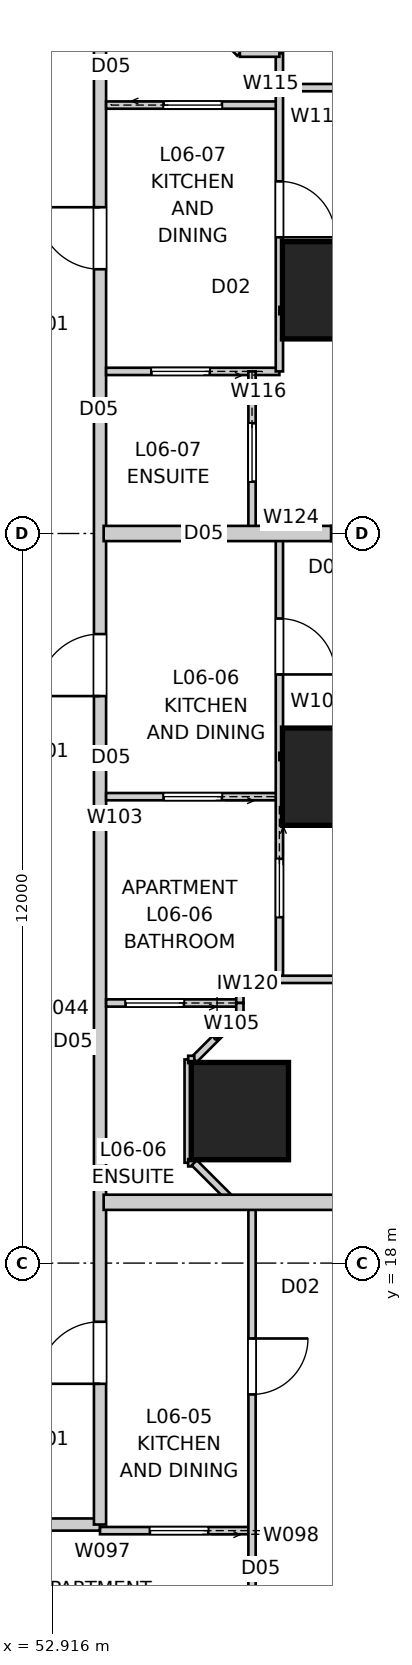
"""IFC4 building model, lengths in metres.
Left out: names, types, materials, properties, quantities, classifications, styles, units other than length and angle.
Written with IfcOpenShell. Run it as: python <this file> out.ifc"""

import sys

from ifc_helpers import new_model, si_unit, direction, frame, frame_2d, origin, origin_2d, place, context, subcontext, project, spatial, rectangle, extrude, element, fill, save


model = new_model("IFC4")
c1 = context("Model", 3, precision=1e-05, world=origin(), true_north=direction((0.0, 1.0)))
c2 = subcontext(c1, "Body", "Model", "MODEL_VIEW")
j1 = project(units=[si_unit("LENGTHUNIT", "METRE"), si_unit("PLANEANGLEUNIT", "RADIAN")], contexts=[c1])
p1 = place(None, origin())
s1 = spatial("IfcSite", under=j1, at=p1, CompositionType="ELEMENT")
p2 = place(p1, origin())
s2 = spatial("IfcBuilding", under=s1, at=p2, CompositionType="ELEMENT")
p3 = place(p2, frame((0.0, 0.0, 25.2)))
s3 = spatial("IfcBuildingStorey", under=s2, at=p3, CompositionType="ELEMENT", Elevation=25.2)
for number, where, z_axis, x_axis in (
    (1, (57.5, 26.0, 0.0), (0.0, 0.0, 1.0), (1.0, 0.0, 0.0)),
    (2, (57.5, 34.0, 0.0), (0.0, 0.0, 1.0), (1.0, 0.0, 0.0)),
    (3, (56.0, 20.5, 0.0), (0.0, 0.0, 1.0), (1.0, 0.0, 0.0)),
):
    element("IfcColumn", number, at=place(p3, frame(where, z_axis=z_axis, x_axis=x_axis)), inside=s3, PredefinedType="COLUMN", context=c2, shape_type="SweptSolid", body=[
        extrude(rectangle(XDim=1.6, YDim=1.6, at=origin_2d()), origin(), (0.0, 0.0, 1.0), 3.4),
    ])
p4 = place(p3, frame((49.242, 13.7, 0.0), z_axis=(0.0, 0.0, 1.0), x_axis=(1.0, 0.0, 0.0)))
e4 = element("IfcWall", 4, at=p4, inside=s3, PredefinedType="PARTITIONING", context=c2, shape_type="SweptSolid", body=[
    extrude(rectangle(XDim=4.458, YDim=0.2, at=frame_2d((2.229, 0.0))), origin(), (0.0, 0.0, 1.0), 3.25),
])
p5 = place(p3, frame((53.7, 13.7, 0.0), z_axis=(0.0, 0.0, 1.0), x_axis=(0.0, 1.0, 0.0)))
e5 = element("IfcWall", 5, at=p5, inside=s3, PredefinedType="PARTITIONING", context=c2, shape_type="SweptSolid", body=[
    extrude(rectangle(XDim=32.6, YDim=0.2, at=frame_2d((16.3, 0.0))), origin(), (0.0, 0.0, 1.0), 3.25),
])
p6 = place(p5, frame((2.315, 0.0, 0.0)))
e6 = element("IfcOpeningElement", 6, at=p6, cuts=e5, PredefinedType="OPENING", context=c2, shape_type="SweptSolid", body=[
    extrude(rectangle(XDim=1.02, YDim=2.34, at=frame_2d((0.51, 1.17))), frame((0.0, 0.11, 0.0), z_axis=(0.0, -1.0, 0.0), x_axis=(1.0, 0.0, 0.0)), (0.0, 0.0, 1.0), 0.22),
])
p7 = place(p5, frame((29.265, 0.0, 0.0)))
e7 = element("IfcOpeningElement", 7, at=p7, cuts=e5, PredefinedType="OPENING", context=c2, shape_type="SweptSolid", body=[
    extrude(rectangle(XDim=1.02, YDim=2.34, at=frame_2d((0.51, 1.17))), frame((0.0, 0.11, 0.0), z_axis=(0.0, -1.0, 0.0), x_axis=(1.0, 0.0, 0.0)), (0.0, 0.0, 1.0), 0.22),
])
p8 = place(p5, frame((20.646, 0.0, 0.0)))
e8 = element("IfcOpeningElement", 8, at=p8, cuts=e5, PredefinedType="OPENING", context=c2, shape_type="SweptSolid", body=[
    extrude(rectangle(XDim=1.02, YDim=2.34, at=frame_2d((0.51, 1.17))), frame((0.0, 0.11, 0.0), z_axis=(0.0, -1.0, 0.0), x_axis=(1.0, 0.0, 0.0)), (0.0, 0.0, 1.0), 0.22),
])
p9 = place(p5, frame((13.626, 0.0, 0.0)))
e9 = element("IfcOpeningElement", 9, at=p9, cuts=e5, PredefinedType="OPENING", context=c2, shape_type="SweptSolid", body=[
    extrude(rectangle(XDim=1.02, YDim=2.34, at=frame_2d((0.51, 1.17))), frame((0.0, 0.11, 0.0), z_axis=(0.0, -1.0, 0.0), x_axis=(1.0, 0.0, 0.0)), (0.0, 0.0, 1.0), 0.22),
])
p10 = place(p3, frame((66.0, 19.0, 0.0), z_axis=(0.0, 0.0, 1.0), x_axis=(-1.0, 0.0, 0.0)))
e10 = element("IfcWall", 10, at=p10, inside=s3, PredefinedType="PARTITIONING", context=c2, shape_type="SweptSolid", body=[
    extrude(rectangle(XDim=12.24, YDim=0.25, at=frame_2d((6.12, 0.0))), origin(), (0.0, 0.0, 1.0), 3.25),
])
p11 = place(p3, frame((66.0, 30.0, 0.0), z_axis=(0.0, 0.0, 1.0), x_axis=(-1.0, 0.0, 0.0)))
e11 = element("IfcWall", 11, at=p11, inside=s3, PredefinedType="PARTITIONING", context=c2, shape_type="SweptSolid", body=[
    extrude(rectangle(XDim=8.5, YDim=0.25, at=frame_2d((4.25, 0.0))), origin(), (0.0, 0.0, 1.0), 3.25),
])
p12 = place(p3, frame((57.5, 30.0, 0.0), z_axis=(0.0, 0.0, 1.0), x_axis=(-1.0, 0.0, 0.0)))
e12 = element("IfcWall", 12, at=p12, inside=s3, PredefinedType="PARTITIONING", context=c2, shape_type="SweptSolid", body=[
    extrude(rectangle(XDim=3.74, YDim=0.25, at=frame_2d((1.87, 0.0))), origin(), (0.0, 0.0, 1.0), 2.796),
])
p13 = place(p3, frame((56.2, 13.6, 0.0), z_axis=(0.0, 0.0, 1.0), x_axis=(-1.0, 0.0, 0.0)))
e13 = element("IfcWall", 13, at=p13, inside=s3, PredefinedType="PARTITIONING", context=c2, shape_type="SweptSolid", body=[
    extrude(rectangle(XDim=2.5, YDim=0.12, at=frame_2d((1.25, 0.0))), origin(), (0.0, 0.0, 1.0), 3.25),
])
p14 = place(p13, frame((0.72, 0.0, 0.0)))
e14 = element("IfcOpeningElement", 14, at=p14, cuts=e13, PredefinedType="OPENING", context=c2, shape_type="SweptSolid", body=[
    extrude(rectangle(XDim=0.96, YDim=2.1, at=frame_2d((0.48, 1.05))), frame((0.0, 0.07, 0.0), z_axis=(0.0, -1.0, 0.0), x_axis=(1.0, 0.0, 0.0)), (0.0, 0.0, 1.0), 0.14),
])
p15 = place(p3, frame((56.2, 19.0, 0.0), z_axis=(0.0, 0.0, 1.0), x_axis=(0.0, -1.0, 0.0)))
e15 = element("IfcWall", 15, at=p15, inside=s3, PredefinedType="PARTITIONING", context=c2, shape_type="SweptSolid", body=[
    extrude(rectangle(XDim=7.8, YDim=0.12, at=frame_2d((3.9, 0.0))), origin(), (0.0, 0.0, 1.0), 3.25),
])
p16 = place(p15, frame((2.24, 0.0, 0.0)))
e16 = element("IfcOpeningElement", 16, at=p16, cuts=e15, PredefinedType="OPENING", context=c2, shape_type="SweptSolid", body=[
    extrude(rectangle(XDim=0.92, YDim=2.34, at=frame_2d((0.46, 1.17))), frame((0.0, 0.07, 0.0), z_axis=(0.0, -1.0, 0.0), x_axis=(1.0, 0.0, 0.0)), (0.0, 0.0, 1.0), 0.14),
])
p17 = place(p3, frame((56.65, 25.672, 0.0), z_axis=(0.0, 0.0, 1.0), x_axis=(-1.0, 0.0, 0.0)))
e17 = element("IfcWall", 17, at=p17, inside=s3, PredefinedType="PARTITIONING", context=c2, shape_type="SweptSolid", body=[
    extrude(rectangle(XDim=2.85, YDim=0.12, at=frame_2d((1.425, 0.0))), origin(), (0.0, 0.0, 1.0), 3.25),
])
p18 = place(p17, frame((0.945, 0.0, 0.0)))
e18 = element("IfcOpeningElement", 18, at=p18, cuts=e17, PredefinedType="OPENING", context=c2, shape_type="SweptSolid", body=[
    extrude(rectangle(XDim=0.96, YDim=2.1, at=frame_2d((0.48, 1.05))), frame((0.0, 0.07, 0.0), z_axis=(0.0, -1.0, 0.0), x_axis=(1.0, 0.0, 0.0)), (0.0, 0.0, 1.0), 0.14),
])
p19 = place(p3, frame((56.65, 30.0, 0.0), z_axis=(0.0, 0.0, 1.0), x_axis=(0.0, -1.0, 0.0)))
e19 = element("IfcWall", 19, at=p19, inside=s3, PredefinedType="PARTITIONING", context=c2, shape_type="SweptSolid", body=[
    extrude(rectangle(XDim=7.333, YDim=0.12, at=frame_2d((3.667, 0.0))), origin(), (0.0, 0.0, 1.0), 2.55),
])
p20 = place(p19, frame((1.398, 0.0, 0.0)))
e20 = element("IfcOpeningElement", 20, at=p20, cuts=e19, PredefinedType="OPENING", context=c2, shape_type="SweptSolid", body=[
    extrude(rectangle(XDim=0.92, YDim=2.34, at=frame_2d((0.46, 1.17))), frame((0.0, 0.07, 0.0), z_axis=(0.0, -1.0, 0.0), x_axis=(1.0, 0.0, 0.0)), (0.0, 0.0, 1.0), 0.14),
])
p21 = place(p19, frame((5.351, 0.0, 0.0)))
e21 = element("IfcOpeningElement", 21, at=p21, cuts=e19, PredefinedType="OPENING", context=c2, shape_type="SweptSolid", body=[
    extrude(rectangle(XDim=0.96, YDim=2.1, at=frame_2d((0.48, 1.05))), frame((0.0, 0.07, 0.0), z_axis=(0.0, -1.0, 0.0), x_axis=(1.0, 0.0, 0.0)), (0.0, 0.0, 1.0), 0.14),
])
p22 = place(p3, frame((56.0, 22.278, 0.0), z_axis=(0.0, 0.0, 1.0), x_axis=(-1.0, 0.0, 0.0)))
e22 = element("IfcWall", 22, at=p22, inside=s3, PredefinedType="PARTITIONING", context=c2, shape_type="SweptSolid", body=[
    extrude(rectangle(XDim=2.2, YDim=0.12, at=frame_2d((1.1, 0.0))), origin(), (0.0, 0.0, 1.0), 3.25),
])
p23 = place(p22, frame((0.92, 0.0, 0.0)))
e23 = element("IfcOpeningElement", 23, at=p23, cuts=e22, PredefinedType="OPENING", context=c2, shape_type="SweptSolid", body=[
    extrude(rectangle(XDim=0.96, YDim=2.1, at=frame_2d((0.48, 1.05))), frame((0.0, 0.07, 0.0), z_axis=(0.0, -1.0, 0.0), x_axis=(1.0, 0.0, 0.0)), (0.0, 0.0, 1.0), 0.14),
])
p24 = place(p3, frame((65.96, 22.667, 0.0), z_axis=(0.0, 0.0, 1.0), x_axis=(-1.0, 0.0, 0.0)))
e24 = element("IfcWall", 24, at=p24, inside=s3, PredefinedType="PARTITIONING", context=c2, shape_type="SweptSolid", body=[
    extrude(rectangle(XDim=9.96, YDim=0.12, at=frame_2d((4.98, 0.0))), origin(), (0.0, 0.0, 1.0), 3.25),
])
p25 = place(p24, frame((4.2, 0.0, 0.0)))
e25 = element("IfcOpeningElement", 25, at=p25, cuts=e24, PredefinedType="OPENING", context=c2, shape_type="SweptSolid", body=[
    extrude(rectangle(XDim=0.92, YDim=2.34, at=frame_2d((0.46, 1.17))), frame((0.0, 0.07, 0.0), z_axis=(0.0, -1.0, 0.0), x_axis=(1.0, 0.0, 0.0)), (0.0, 0.0, 1.0), 0.14),
])
p26 = place(p3, frame((56.0, 22.667, 0.0), z_axis=(0.0, 0.0, 1.0), x_axis=(0.0, -1.0, 0.0)))
e26 = element("IfcWall", 26, at=p26, inside=s3, PredefinedType="PARTITIONING", context=c2, shape_type="SweptSolid", body=[
    extrude(rectangle(XDim=0.389, YDim=0.12, at=frame_2d((0.194, 0.0))), origin(), (0.0, 0.0, 1.0), 3.25),
])
p27 = place(p3, frame((56.0, 22.1, 0.0), z_axis=(0.0, 0.0, 1.0), x_axis=(-0.707106781187, -0.707106781187, 0.0)))
e27 = element("IfcWall", 27, at=p27, inside=s3, PredefinedType="PARTITIONING", context=c2, shape_type="SweptSolid", body=[
    extrude(rectangle(XDim=1.061, YDim=0.12, at=frame_2d((0.53, 0.0))), origin(), (0.0, 0.0, 1.0), 3.25),
])
p28 = place(p3, frame((55.15, 21.35, 0.0), z_axis=(0.0, 0.0, 1.0), x_axis=(0.0, -1.0, 0.0)))
e28 = element("IfcWall", 28, at=p28, inside=s3, PredefinedType="PARTITIONING", context=c2, shape_type="SweptSolid", body=[
    extrude(rectangle(XDim=1.7, YDim=0.12, at=frame_2d((0.85, 0.0))), origin(), (0.0, 0.0, 1.0), 3.25),
])
p29 = place(p3, frame((55.25, 19.65, 0.0), z_axis=(0.0, 0.0, 1.0), x_axis=(0.707106781187, -0.707106781187, 0.0)))
e29 = element("IfcWall", 29, at=p29, inside=s3, PredefinedType="PARTITIONING", context=c2, shape_type="SweptSolid", body=[
    extrude(rectangle(XDim=0.919, YDim=0.12, at=frame_2d((0.459, 0.0))), origin(), (0.0, 0.0, 1.0), 3.25),
])
p30 = place(p3, frame((65.96, 26.333, 0.0), z_axis=(0.0, 0.0, 1.0), x_axis=(-1.0, 0.0, 0.0)))
e30 = element("IfcWall", 30, at=p30, inside=s3, PredefinedType="PARTITIONING", context=c2, shape_type="SweptSolid", body=[
    extrude(rectangle(XDim=9.31, YDim=0.12, at=frame_2d((4.655, 0.0))), origin(), (0.0, 0.0, 1.0), 3.25),
])
p31 = place(p3, frame((53.8, 37.046, 0.0), z_axis=(0.0, 0.0, 1.0), x_axis=(1.0, 0.0, 0.0)))
e31 = element("IfcWall", 31, at=p31, inside=s3, PredefinedType="PARTITIONING", context=c2, shape_type="SweptSolid", body=[
    extrude(rectangle(XDim=2.85, YDim=0.12, at=frame_2d((1.425, 0.0))), origin(), (0.0, 0.0, 1.0), 3.25),
])
p32 = place(p31, frame((0.945, 0.0, 0.0)))
e32 = element("IfcOpeningElement", 32, at=p32, cuts=e31, PredefinedType="OPENING", context=c2, shape_type="SweptSolid", body=[
    extrude(rectangle(XDim=0.96, YDim=2.1, at=frame_2d((0.48, 1.05))), frame((0.0, 0.07, 0.0), z_axis=(0.0, -1.0, 0.0), x_axis=(1.0, 0.0, 0.0)), (0.0, 0.0, 1.0), 0.14),
])
p33 = place(p3, frame((56.65, 32.666, 0.0), z_axis=(0.0, 0.0, 1.0), x_axis=(-1.0, 0.0, 0.0)))
e33 = element("IfcWall", 33, at=p33, inside=s3, PredefinedType="PARTITIONING", context=c2, shape_type="SweptSolid", body=[
    extrude(rectangle(XDim=2.85, YDim=0.12, at=frame_2d((1.425, 0.0))), origin(), (0.0, 0.0, 1.0), 3.25),
])
p34 = place(p33, frame((1.145, 0.0, 0.0)))
e34 = element("IfcOpeningElement", 34, at=p34, cuts=e33, PredefinedType="OPENING", context=c2, shape_type="SweptSolid", body=[
    extrude(rectangle(XDim=0.96, YDim=2.1, at=frame_2d((0.48, 1.05))), frame((0.0, 0.07, 0.0), z_axis=(0.0, -1.0, 0.0), x_axis=(1.0, 0.0, 0.0)), (0.0, 0.0, 1.0), 0.14),
])
p35 = place(p3, frame((56.65, 37.9, 0.0), z_axis=(0.0, 0.0, 1.0), x_axis=(0.0, -1.0, 0.0)))
e35 = element("IfcWall", 35, at=p35, inside=s3, PredefinedType="PARTITIONING", context=c2, shape_type="SweptSolid", body=[
    extrude(rectangle(XDim=5.234, YDim=0.12, at=frame_2d((2.617, 0.0))), origin(), (0.0, 0.0, 1.0), 2.55),
])
p36 = place(p35, frame((2.109, 0.0, 0.0)))
e36 = element("IfcOpeningElement", 36, at=p36, cuts=e35, PredefinedType="OPENING", context=c2, shape_type="SweptSolid", body=[
    extrude(rectangle(XDim=0.92, YDim=2.34, at=frame_2d((0.46, 1.17))), frame((0.0, 0.07, 0.0), z_axis=(0.0, -1.0, 0.0), x_axis=(1.0, 0.0, 0.0)), (0.0, 0.0, 1.0), 0.14),
])
p37 = place(p3, frame((55.25, 38.65, 0.0), z_axis=(0.0, 0.0, 1.0), x_axis=(0.707106781187, -0.707106781187, 0.0)))
e37 = element("IfcWall", 37, at=p37, inside=s3, PredefinedType="PARTITIONING", context=c2, shape_type="SweptSolid", body=[
    extrude(rectangle(XDim=1.061, YDim=0.12, at=frame_2d((0.53, 0.0))), origin(), (0.0, 0.0, 1.0), 3.25),
])
p38 = place(p3, frame((56.0, 37.9, 0.0), z_axis=(0.0, 0.0, 1.0), x_axis=(1.0, 0.0, 0.0)))
e38 = element("IfcWall", 38, at=p38, inside=s3, PredefinedType="PARTITIONING", context=c2, shape_type="SweptSolid", body=[
    extrude(rectangle(XDim=0.65, YDim=0.12, at=frame_2d((0.325, 0.0))), origin(), (0.0, 0.0, 1.0), 3.25),
])
p39 = place(p3, frame((56.2, 32.666, 0.0), z_axis=(0.0, 0.0, 1.0), x_axis=(0.0, -1.0, 0.0)))
e39 = element("IfcWall", 39, at=p39, inside=s3, PredefinedType="PARTITIONING", context=c2, shape_type="SweptSolid", body=[
    extrude(rectangle(XDim=2.666, YDim=0.12, at=frame_2d((1.333, 0.0))), origin(), (0.0, 0.0, 1.0), 3.25),
])
p40 = place(p39, frame((0.853, 0.0, 0.0)))
e40 = element("IfcOpeningElement", 40, at=p40, cuts=e39, PredefinedType="OPENING", context=c2, shape_type="SweptSolid", body=[
    extrude(rectangle(XDim=0.96, YDim=2.1, at=frame_2d((0.48, 1.05))), frame((0.0, 0.07, 0.0), z_axis=(0.0, -1.0, 0.0), x_axis=(1.0, 0.0, 0.0)), (0.0, 0.0, 1.0), 0.14),
])
p41 = place(p3, frame((56.65, 33.667, 0.0), z_axis=(0.0, 0.0, 1.0), x_axis=(1.0, 0.0, 0.0)))
e41 = element("IfcWall", 41, at=p41, inside=s3, PredefinedType="PARTITIONING", context=c2, shape_type="SweptSolid", body=[
    extrude(rectangle(XDim=9.31, YDim=0.12, at=frame_2d((4.655, 0.0))), origin(), (0.0, 0.0, 1.0), 3.25),
])
p42 = place(p3, frame((65.96, 37.333, 0.0), z_axis=(0.0, 0.0, 1.0), x_axis=(-1.0, 0.0, 0.0)))
e42 = element("IfcWall", 42, at=p42, inside=s3, PredefinedType="PARTITIONING", context=c2, shape_type="SweptSolid", body=[
    extrude(rectangle(XDim=9.31, YDim=0.12, at=frame_2d((4.655, 0.0))), origin(), (0.0, 0.0, 1.0), 3.25),
])
p43 = place(p42, frame((4.175, 0.0, 0.0)))
e43 = element("IfcOpeningElement", 43, at=p43, cuts=e42, PredefinedType="OPENING", context=c2, shape_type="SweptSolid", body=[
    extrude(rectangle(XDim=0.92, YDim=2.34, at=frame_2d((0.46, 1.17))), frame((0.0, 0.07, 0.0), z_axis=(0.0, -1.0, 0.0), x_axis=(1.0, 0.0, 0.0)), (0.0, 0.0, 1.0), 0.14),
])
p44 = place(p3, frame((56.0, 22.1, 0.0), z_axis=(0.0, 0.0, 1.0), x_axis=(0.0, 1.0, 0.0)))
e44 = element("IfcWall", 44, at=p44, inside=s3, PredefinedType="PARTITIONING", context=c2, shape_type="SweptSolid", body=[
    extrude(rectangle(XDim=0.178, YDim=0.12, at=frame_2d((0.089, 0.0))), origin(), (0.0, 0.0, 1.0), 3.25),
])
for number, where, z_axis, x_axis in (
    (45, (55.15, 21.35, 0.0), (0.0, 0.0, 1.0), (1.0, 0.0, 0.0)),
    (46, (55.15, 19.65, 0.0), (0.0, 0.0, 1.0), (1.0, 0.0, 0.0)),
):
    element("IfcWall", number, at=place(p3, frame(where, z_axis=z_axis, x_axis=x_axis)), inside=s3, PredefinedType="PARTITIONING", context=c2, shape_type="SweptSolid", body=[
        extrude(rectangle(XDim=0.1, YDim=0.12, at=frame_2d((0.05, 0.0))), origin(), (0.0, 0.0, 1.0), 3.25),
    ])
p45 = place(p6, origin())
e47 = element("IfcDoor", 47, at=p45, inside=s3, OperationType="SINGLE_SWING_LEFT", PredefinedType="DOOR", context=c2, shape_type="SweptSolid", body=[
    extrude(rectangle(XDim=1.02, YDim=2.34, at=frame_2d((0.51, 1.17))), frame((0.0, 0.025, 0.0), z_axis=(0.0, -1.0, 0.0), x_axis=(1.0, 0.0, 0.0)), (0.0, 0.0, 1.0), 0.05),
])
fill(e6, e47)
p46 = place(p8, origin())
e48 = element("IfcDoor", 48, at=p46, inside=s3, OperationType="SINGLE_SWING_RIGHT", PredefinedType="DOOR", context=c2, shape_type="SweptSolid", body=[
    extrude(rectangle(XDim=1.02, YDim=2.34, at=frame_2d((0.51, 1.17))), frame((0.0, 0.025, 0.0), z_axis=(0.0, -1.0, 0.0), x_axis=(1.0, 0.0, 0.0)), (0.0, 0.0, 1.0), 0.05),
])
fill(e8, e48)
p47 = place(p9, origin())
e49 = element("IfcDoor", 49, at=p47, inside=s3, OperationType="SINGLE_SWING_LEFT", PredefinedType="DOOR", context=c2, shape_type="SweptSolid", body=[
    extrude(rectangle(XDim=1.02, YDim=2.34, at=frame_2d((0.51, 1.17))), frame((0.0, 0.025, 0.0), z_axis=(0.0, -1.0, 0.0), x_axis=(1.0, 0.0, 0.0)), (0.0, 0.0, 1.0), 0.05),
])
fill(e9, e49)
p48 = place(p16, origin())
e50 = element("IfcDoor", 50, at=p48, inside=s3, OperationType="SINGLE_SWING_LEFT", PredefinedType="DOOR", context=c2, shape_type="SweptSolid", body=[
    extrude(rectangle(XDim=0.92, YDim=2.34, at=frame_2d((0.46, 1.17))), frame((0.0, 0.025, 0.0), z_axis=(0.0, -1.0, 0.0), x_axis=(1.0, 0.0, 0.0)), (0.0, 0.0, 1.0), 0.05),
])
fill(e16, e50)
p49 = place(p14, origin())
e51 = element("IfcDoor", 51, at=p49, inside=s3, OperationType="SLIDING_TO_LEFT", PredefinedType="DOOR", context=c2, shape_type="SweptSolid", body=[
    extrude(rectangle(XDim=0.96, YDim=2.1, at=frame_2d((0.48, 1.05))), frame((0.0, 0.025, 0.0), z_axis=(0.0, -1.0, 0.0), x_axis=(1.0, 0.0, 0.0)), (0.0, 0.0, 1.0), 0.05),
])
fill(e14, e51)
p50 = place(p36, origin())
e52 = element("IfcDoor", 52, at=p50, inside=s3, OperationType="SINGLE_SWING_RIGHT", PredefinedType="DOOR", context=c2, shape_type="SweptSolid", body=[
    extrude(rectangle(XDim=0.92, YDim=2.34, at=frame_2d((0.46, 1.17))), frame((0.0, 0.025, 0.0), z_axis=(0.0, -1.0, 0.0), x_axis=(1.0, 0.0, 0.0)), (0.0, 0.0, 1.0), 0.05),
])
fill(e36, e52)
p51 = place(p32, origin())
e53 = element("IfcDoor", 53, at=p51, inside=s3, OperationType="SLIDING_TO_LEFT", PredefinedType="DOOR", context=c2, shape_type="SweptSolid", body=[
    extrude(rectangle(XDim=0.96, YDim=2.1, at=frame_2d((0.48, 1.05))), frame((0.0, 0.025, 0.0), z_axis=(0.0, -1.0, 0.0), x_axis=(1.0, 0.0, 0.0)), (0.0, 0.0, 1.0), 0.05),
])
fill(e32, e53)
p52 = place(p34, origin())
e54 = element("IfcDoor", 54, at=p52, inside=s3, OperationType="SLIDING_TO_LEFT", PredefinedType="DOOR", context=c2, shape_type="SweptSolid", body=[
    extrude(rectangle(XDim=0.96, YDim=2.1, at=frame_2d((0.48, 1.05))), frame((0.0, 0.025, 0.0), z_axis=(0.0, -1.0, 0.0), x_axis=(1.0, 0.0, 0.0)), (0.0, 0.0, 1.0), 0.05),
])
fill(e34, e54)
p53 = place(p20, origin())
e55 = element("IfcDoor", 55, at=p53, inside=s3, OperationType="SINGLE_SWING_RIGHT", PredefinedType="DOOR", context=c2, shape_type="SweptSolid", body=[
    extrude(rectangle(XDim=0.92, YDim=2.34, at=frame_2d((0.46, 1.17))), frame((0.0, 0.025, 0.0), z_axis=(0.0, -1.0, 0.0), x_axis=(1.0, 0.0, 0.0)), (0.0, 0.0, 1.0), 0.05),
])
fill(e20, e55)
p54 = place(p18, origin())
e56 = element("IfcDoor", 56, at=p54, inside=s3, OperationType="SLIDING_TO_LEFT", PredefinedType="DOOR", context=c2, shape_type="SweptSolid", body=[
    extrude(rectangle(XDim=0.96, YDim=2.1, at=frame_2d((0.48, 1.05))), frame((0.0, 0.025, 0.0), z_axis=(0.0, -1.0, 0.0), x_axis=(1.0, 0.0, 0.0)), (0.0, 0.0, 1.0), 0.05),
])
fill(e18, e56)
p55 = place(p40, origin())
e57 = element("IfcDoor", 57, at=p55, inside=s3, OperationType="SLIDING_TO_LEFT", PredefinedType="DOOR", context=c2, shape_type="SweptSolid", body=[
    extrude(rectangle(XDim=0.96, YDim=2.1, at=frame_2d((0.48, 1.05))), frame((0.0, 0.025, 0.0), z_axis=(0.0, -1.0, 0.0), x_axis=(1.0, 0.0, 0.0)), (0.0, 0.0, 1.0), 0.05),
])
fill(e40, e57)
p56 = place(p21, origin())
e58 = element("IfcDoor", 58, at=p56, inside=s3, OperationType="SLIDING_TO_LEFT", PredefinedType="DOOR", context=c2, shape_type="SweptSolid", body=[
    extrude(rectangle(XDim=0.96, YDim=2.1, at=frame_2d((0.48, 1.05))), frame((0.0, 0.025, 0.0), z_axis=(0.0, -1.0, 0.0), x_axis=(1.0, 0.0, 0.0)), (0.0, 0.0, 1.0), 0.05),
])
fill(e21, e58)
p57 = place(p23, origin())
e59 = element("IfcDoor", 59, at=p57, inside=s3, OperationType="SLIDING_TO_LEFT", PredefinedType="DOOR", context=c2, shape_type="SweptSolid", body=[
    extrude(rectangle(XDim=0.96, YDim=2.1, at=frame_2d((0.48, 1.05))), frame((0.0, 0.025, 0.0), z_axis=(0.0, -1.0, 0.0), x_axis=(1.0, 0.0, 0.0)), (0.0, 0.0, 1.0), 0.05),
])
fill(e23, e59)
save(model, sys.argv[1])
